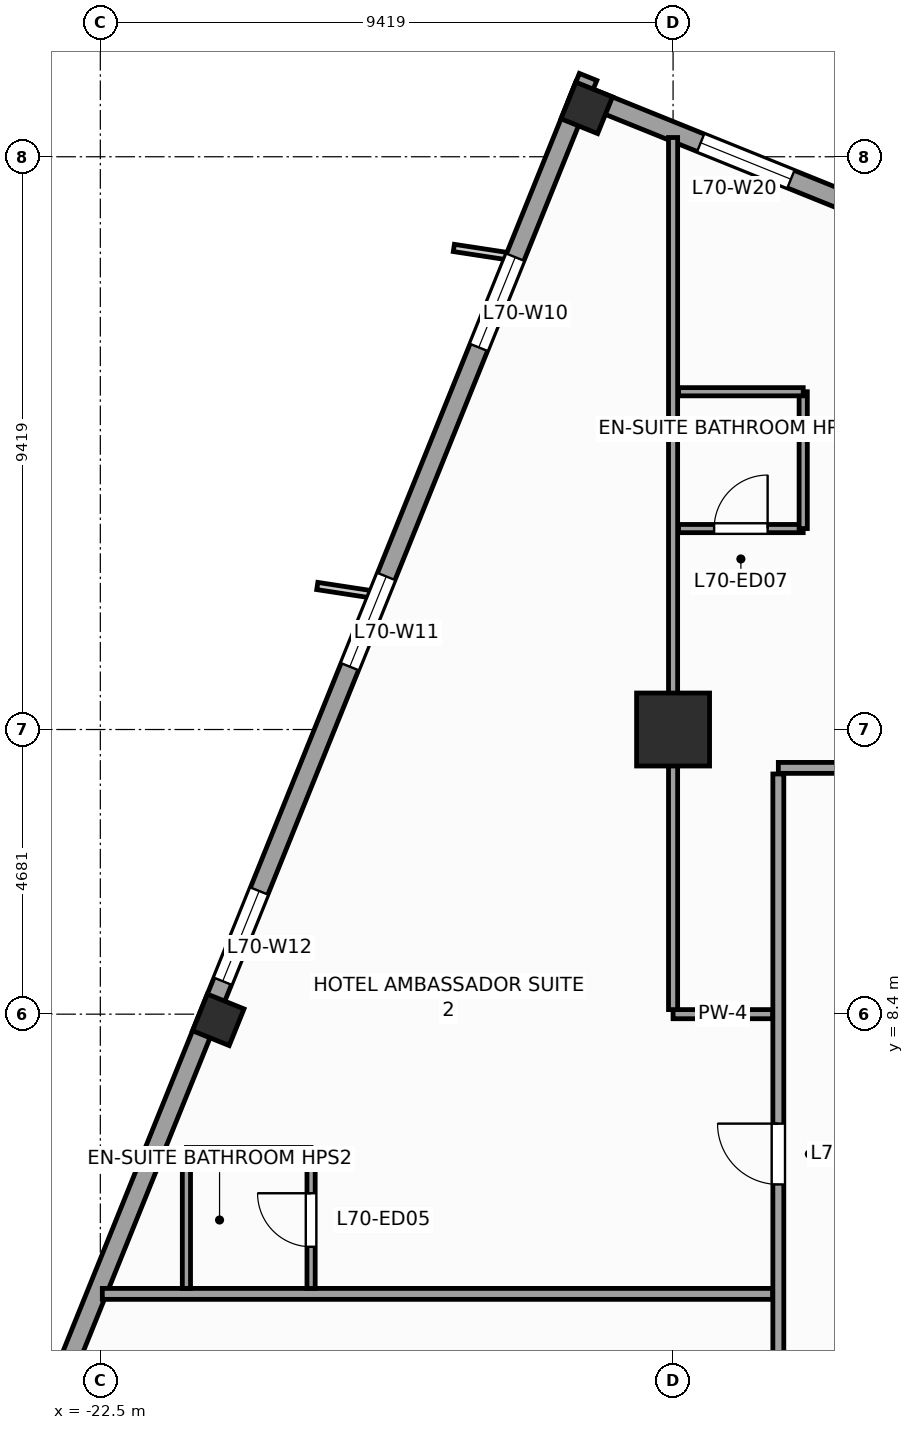
"""IFC4 building model, lengths in metres.
Left out: names, types, materials, properties, quantities, classifications, styles, units other than length and angle.
Written with IfcOpenShell. Run it as: python <this file> out.ifc"""

import sys

from ifc_helpers import new_model, si_unit, direction, frame, frame_2d, origin, origin_2d, place, context, subcontext, project, spatial, rectangle, extrude, source, transform, mapped, element, fill, save


model = new_model("IFC4")
c1 = context("Model", 3, precision=1e-05, world=origin(), true_north=direction((0.0, 1.0)))
c2 = subcontext(c1, "Body", "Model", "MODEL_VIEW")
j1 = project(units=[si_unit("LENGTHUNIT", "METRE"), si_unit("PLANEANGLEUNIT", "RADIAN")], contexts=[c1])
p1 = place(None, origin())
s1 = spatial("IfcSite", under=j1, at=p1, CompositionType="ELEMENT")
p2 = place(p1, origin())
s2 = spatial("IfcBuilding", under=s1, at=p2, CompositionType="ELEMENT")
p3 = place(p2, frame((0.0, 0.0, 286.8)))
s3 = spatial("IfcBuildingStorey", under=s2, at=p3, CompositionType="ELEMENT", Elevation=286.8)
m1 = source(origin(), c2, "Body", "SweptSolid", [
    extrude(rectangle(XDim=1.2, YDim=1.2, at=origin_2d()), origin(), (0.0, 0.0, 1.0), 3.6),
])
p4 = place(p3, frame((-13.081, 13.081, 0.0), z_axis=(0.0, 0.0, 1.0), x_axis=(1.0, 0.0, 0.0)))
e1 = element("IfcColumn", 1, at=p4, inside=s3, PredefinedType="COLUMN", context=c2, shape_type="MappedRepresentation", body=[
    mapped(m1, transform((0.0, 0.0, 0.0), scale=1.0)),
])
m2 = source(origin(), c2, "Body", "SweptSolid", [
    extrude(rectangle(XDim=0.65, YDim=0.65, at=origin_2d()), origin(), (0.0, 0.0, 1.0), 3.6),
])
for number, where, z_axis, x_axis in (
    (2, (-14.501, 23.304, 0.0), (0.0, 0.0, 1.0), (0.375, 0.927, 0.0)),
    (3, (-20.56, 8.307, 0.0), (0.0, 0.0, 1.0), (0.375, 0.927, 0.0)),
):
    element("IfcColumn", number, at=place(p3, frame(where, z_axis=z_axis, x_axis=x_axis)), inside=s3, PredefinedType="COLUMN", context=c2, shape_type="MappedRepresentation", body=[
        mapped(m2, transform((0.0, 0.0, 0.0), scale=1.0)),
    ])
p5 = place(p3, frame((-9.032, 21.278, 0.0), z_axis=(0.0, 0.0, 1.0), x_axis=(-0.927185411764, 0.374602739196, 0.0)))
e4 = element("IfcWall", 4, at=p5, inside=s3, PredefinedType="STANDARD", context=c2, shape_type="SweptSolid", body=[
    extrude(rectangle(XDim=6.155, YDim=0.31, at=frame_2d((3.078, 0.0))), origin(), (0.0, 0.0, 1.0), 3.35),
])
p6 = place(p5, frame((2.278, 0.0, 0.47)))
e5 = element("IfcOpeningElement", 5, at=p6, cuts=e4, PredefinedType="OPENING", context=c2, shape_type="SweptSolid", body=[
    extrude(rectangle(XDim=1.6, YDim=2.1, at=frame_2d((0.8, 1.05))), frame((0.0, 0.165, 0.0), z_axis=(0.0, -1.0, 0.0), x_axis=(1.0, 0.0, 0.0)), (0.0, 0.0, 1.0), 0.33),
])
p7 = place(p3, frame((-14.479, 23.813, 0.0), z_axis=(0.0, 0.0, 1.0), x_axis=(-0.374609557019, -0.927182657188, 0.0)))
e6 = element("IfcWall", 6, at=p7, inside=s3, PredefinedType="STANDARD", context=c2, shape_type="SweptSolid", body=[
    extrude(rectangle(XDim=33.31, YDim=0.31, at=frame_2d((16.655, 0.0))), origin(), (0.0, 0.0, 1.0), 2.75),
])
p8 = place(p7, frame((3.197, 0.0, 0.47)))
e7 = element("IfcOpeningElement", 7, at=p8, cuts=e6, PredefinedType="OPENING", context=c2, shape_type="SweptSolid", body=[
    extrude(rectangle(XDim=1.6, YDim=2.1, at=frame_2d((0.8, 1.05))), frame((0.0, 0.165, 0.0), z_axis=(0.0, -1.0, 0.0), x_axis=(1.0, 0.0, 0.0)), (0.0, 0.0, 1.0), 0.33),
])
p9 = place(p7, frame((8.86, 0.0, 0.47)))
e8 = element("IfcOpeningElement", 8, at=p9, cuts=e6, PredefinedType="OPENING", context=c2, shape_type="SweptSolid", body=[
    extrude(rectangle(XDim=1.6, YDim=2.1, at=frame_2d((0.8, 1.05))), frame((0.0, 0.165, 0.0), z_axis=(0.0, -1.0, 0.0), x_axis=(1.0, 0.0, 0.0)), (0.0, 0.0, 1.0), 0.33),
])
p10 = place(p7, frame((14.439, 0.0, 0.47)))
e9 = element("IfcOpeningElement", 9, at=p10, cuts=e6, PredefinedType="OPENING", context=c2, shape_type="SweptSolid", body=[
    extrude(rectangle(XDim=1.6, YDim=2.1, at=frame_2d((0.8, 1.05))), frame((0.0, 0.165, 0.0), z_axis=(0.0, -1.0, 0.0), x_axis=(1.0, 0.0, 0.0)), (0.0, 0.0, 1.0), 0.33),
])
p11 = place(p7, frame((23.351, 0.0, 0.47)))
e10 = element("IfcOpeningElement", 10, at=p11, cuts=e6, PredefinedType="OPENING", context=c2, shape_type="SweptSolid", body=[
    extrude(rectangle(XDim=1.6, YDim=2.1, at=frame_2d((0.8, 1.05))), frame((0.0, 0.165, 0.0), z_axis=(0.0, -1.0, 0.0), x_axis=(1.0, 0.0, 0.0)), (0.0, 0.0, 1.0), 0.33),
])
p12 = place(p7, frame((30.097, 0.0, 0.47)))
e11 = element("IfcOpeningElement", 11, at=p12, cuts=e6, PredefinedType="OPENING", context=c2, shape_type="SweptSolid", body=[
    extrude(rectangle(XDim=1.6, YDim=2.1, at=frame_2d((0.8, 1.05))), frame((0.0, 0.165, 0.0), z_axis=(0.0, -1.0, 0.0), x_axis=(1.0, 0.0, 0.0)), (0.0, 0.0, 1.0), 0.33),
])
p13 = place(p7, frame((27.59, 0.0, 0.47)))
e12 = element("IfcOpeningElement", 12, at=p13, cuts=e6, PredefinedType="OPENING", context=c2, shape_type="SweptSolid", body=[
    extrude(rectangle(XDim=1.6, YDim=2.1, at=frame_2d((0.8, 1.05))), frame((0.0, 0.165, 0.0), z_axis=(0.0, -1.0, 0.0), x_axis=(1.0, 0.0, 0.0)), (0.0, 0.0, 1.0), 0.33),
])
p14 = place(p3, frame((-11.35, 12.45, 0.0), z_axis=(0.0, 0.0, 1.0), x_axis=(1.0, 0.0, 0.0)))
e13 = element("IfcWall", 13, at=p14, inside=s3, PredefinedType="PARTITIONING", context=c2, shape_type="SweptSolid", body=[
    extrude(rectangle(XDim=22.8, YDim=0.18, at=frame_2d((11.4, 0.0))), origin(), (0.0, 0.0, 1.0), 3.35),
])
p15 = place(p14, frame((6.089, 0.0, 0.0)))
e14 = element("IfcOpeningElement", 14, at=p15, cuts=e13, PredefinedType="OPENING", context=c2, shape_type="SweptSolid", body=[
    extrude(rectangle(XDim=1.0, YDim=2.15, at=frame_2d((0.5, 1.075))), frame((0.0, 0.1, 0.0), z_axis=(0.0, -1.0, 0.0), x_axis=(1.0, 0.0, 0.0)), (0.0, 0.0, 1.0), 0.2),
])
p16 = place(p14, frame((17.161, 0.0, 0.0)))
e15 = element("IfcOpeningElement", 15, at=p16, cuts=e13, PredefinedType="OPENING", context=c2, shape_type="SweptSolid", body=[
    extrude(rectangle(XDim=1.0, YDim=2.15, at=frame_2d((0.5, 1.075))), frame((0.0, 0.1, 0.0), z_axis=(0.0, -1.0, 0.0), x_axis=(1.0, 0.0, 0.0)), (0.0, 0.0, 1.0), 0.2),
])
p17 = place(p3, frame((-11.35, -10.2, 0.0), z_axis=(0.0, 0.0, 1.0), x_axis=(0.0, 1.0, 0.0)))
e16 = element("IfcWall", 16, at=p17, inside=s3, PredefinedType="PARTITIONING", context=c2, shape_type="SweptSolid", body=[
    extrude(rectangle(XDim=22.55, YDim=0.18, at=frame_2d((11.275, 0.0))), origin(), (0.0, 0.0, 1.0), 3.35),
])
p18 = place(p17, frame((11.6, 0.0, 0.0)))
e17 = element("IfcOpeningElement", 17, at=p18, cuts=e16, PredefinedType="OPENING", context=c2, shape_type="SweptSolid", body=[
    extrude(rectangle(XDim=1.0, YDim=2.15, at=frame_2d((0.5, 1.075))), frame((0.0, 0.1, 0.0), z_axis=(0.0, -1.0, 0.0), x_axis=(1.0, 0.0, 0.0)), (0.0, 0.0, 1.0), 0.2),
])
p19 = place(p17, frame((15.8, 0.0, 0.0)))
e18 = element("IfcOpeningElement", 18, at=p19, cuts=e16, PredefinedType="OPENING", context=c2, shape_type="SweptSolid", body=[
    extrude(rectangle(XDim=1.0, YDim=2.15, at=frame_2d((0.5, 1.075))), frame((0.0, 0.1, 0.0), z_axis=(0.0, -1.0, 0.0), x_axis=(1.0, 0.0, 0.0)), (0.0, 0.0, 1.0), 0.2),
])
p20 = place(p17, frame((3.6, 0.0, 0.0)))
e19 = element("IfcOpeningElement", 19, at=p20, cuts=e16, PredefinedType="OPENING", context=c2, shape_type="SweptSolid", body=[
    extrude(rectangle(XDim=1.0, YDim=2.15, at=frame_2d((0.5, 1.075))), frame((0.0, 0.1, 0.0), z_axis=(0.0, -1.0, 0.0), x_axis=(1.0, 0.0, 0.0)), (0.0, 0.0, 1.0), 0.2),
])
p21 = place(p17, frame((7.8, 0.0, 0.0)))
e20 = element("IfcOpeningElement", 20, at=p21, cuts=e16, PredefinedType="OPENING", context=c2, shape_type="SweptSolid", body=[
    extrude(rectangle(XDim=1.0, YDim=2.15, at=frame_2d((0.5, 1.075))), frame((0.0, 0.1, 0.0), z_axis=(0.0, -1.0, 0.0), x_axis=(1.0, 0.0, 0.0)), (0.0, 0.0, 1.0), 0.2),
])
p22 = place(p3, frame((-11.445, 3.8, 0.0), z_axis=(0.0, 0.0, 1.0), x_axis=(-1.0, 0.0, 0.0)))
e21 = element("IfcWall", 21, at=p22, inside=s3, PredefinedType="PARTITIONING", context=c2, shape_type="SweptSolid", body=[
    extrude(rectangle(XDim=11.022, YDim=0.18, at=frame_2d((5.511, 0.0))), origin(), (0.0, 0.0, 1.0), 3.02),
])
p23 = place(p3, frame((-11.445, 8.4, 0.0), z_axis=(0.0, 0.0, 1.0), x_axis=(-1.0, 0.0, 0.0)))
e22 = element("IfcWall", 22, at=p23, inside=s3, PredefinedType="PARTITIONING", context=c2, shape_type="SweptSolid", body=[
    extrude(rectangle(XDim=1.636, YDim=0.15, at=frame_2d((0.818, 0.0))), origin(), (0.0, 0.0, 1.0), 3.35),
])
p24 = place(p3, frame((-13.081, 8.475, 0.0), z_axis=(0.0, 0.0, 1.0), x_axis=(0.0, 1.0, 0.0)))
e23 = element("IfcWall", 23, at=p24, inside=s3, PredefinedType="PARTITIONING", context=c2, shape_type="SweptSolid", body=[
    extrude(rectangle(XDim=14.342, YDim=0.15, at=frame_2d((7.171, 0.0))), origin(), (0.0, 0.0, 1.0), 2.45),
])
p25 = place(p3, frame((-19.034, 3.89, 0.0), z_axis=(0.0, 0.0, 1.0), x_axis=(0.0, 1.0, 0.0)))
e24 = element("IfcWall", 24, at=p25, inside=s3, PredefinedType="PARTITIONING", context=c2, shape_type="SweptSolid", body=[
    extrude(rectangle(XDim=2.25, YDim=0.135, at=frame_2d((1.125, 0.0))), origin(), (0.0, 0.0, 1.0), 3.35),
])
p26 = place(p25, frame((0.685, 0.0, 0.0)))
e25 = element("IfcOpeningElement", 25, at=p26, cuts=e24, PredefinedType="OPENING", context=c2, shape_type="SweptSolid", body=[
    extrude(rectangle(XDim=0.88, YDim=2.1, at=frame_2d((0.44, 1.05))), frame((0.0, 0.078, 0.0), z_axis=(0.0, -1.0, 0.0), x_axis=(1.0, 0.0, 0.0)), (0.0, 0.0, 1.0), 0.155),
])
p27 = place(p3, frame((-21.084, 6.14, 0.0), z_axis=(0.0, 0.0, 1.0), x_axis=(1.0, 0.0, 0.0)))
e26 = element("IfcWall", 26, at=p27, inside=s3, PredefinedType="PARTITIONING", context=c2, shape_type="SweptSolid", body=[
    extrude(rectangle(XDim=2.05, YDim=0.135, at=frame_2d((1.025, 0.0))), origin(), (0.0, 0.0, 1.0), 3.35),
])
p28 = place(p3, frame((-21.084, 3.89, 0.0), z_axis=(0.0, 0.0, 1.0), x_axis=(0.0, 1.0, 0.0)))
e27 = element("IfcWall", 27, at=p28, inside=s3, PredefinedType="PARTITIONING", context=c2, shape_type="SweptSolid", body=[
    extrude(rectangle(XDim=2.25, YDim=0.135, at=frame_2d((1.125, 0.0))), origin(), (0.0, 0.0, 1.0), 3.35),
])
p29 = place(p3, frame((-12.991, 16.386, 0.0), z_axis=(0.0, 0.0, 1.0), x_axis=(1.0, 0.0, 0.0)))
e28 = element("IfcWall", 28, at=p29, inside=s3, PredefinedType="PARTITIONING", context=c2, shape_type="SweptSolid", body=[
    extrude(rectangle(XDim=2.05, YDim=0.135, at=frame_2d((1.025, 0.0))), origin(), (0.0, 0.0, 1.0), 3.35),
])
p30 = place(p29, frame((0.585, 0.0, 0.0)))
e29 = element("IfcOpeningElement", 29, at=p30, cuts=e28, PredefinedType="OPENING", context=c2, shape_type="SweptSolid", body=[
    extrude(rectangle(XDim=0.88, YDim=2.1, at=frame_2d((0.44, 1.05))), frame((0.0, 0.078, 0.0), z_axis=(0.0, -1.0, 0.0), x_axis=(1.0, 0.0, 0.0)), (0.0, 0.0, 1.0), 0.155),
])
p31 = place(p3, frame((-10.941, 16.386, 0.0), z_axis=(0.0, 0.0, 1.0), x_axis=(0.0, 1.0, 0.0)))
e30 = element("IfcWall", 30, at=p31, inside=s3, PredefinedType="PARTITIONING", context=c2, shape_type="SweptSolid", body=[
    extrude(rectangle(XDim=2.25, YDim=0.135, at=frame_2d((1.125, 0.0))), origin(), (0.0, 0.0, 1.0), 3.35),
])
p32 = place(p3, frame((-12.991, 18.636, 0.0), z_axis=(0.0, 0.0, 1.0), x_axis=(1.0, 0.0, 0.0)))
e31 = element("IfcWall", 31, at=p32, inside=s3, PredefinedType="PARTITIONING", context=c2, shape_type="SweptSolid", body=[
    extrude(rectangle(XDim=2.05, YDim=0.135, at=frame_2d((1.025, 0.0))), origin(), (0.0, 0.0, 1.0), 3.35),
])
m3 = source(origin(), c2, "Body", "SweptSolid", [
    extrude(rectangle(XDim=1.6, YDim=2.1, at=frame_2d((0.8, 1.05))), frame((0.0, 0.03, 0.0), z_axis=(0.0, -1.0, 0.0), x_axis=(1.0, 0.0, 0.0)), (0.0, 0.0, 1.0), 0.06),
])
p33 = place(p8, origin())
e32 = element("IfcWindow", 32, at=p33, inside=s3, PartitioningType="SINGLE_PANEL", PredefinedType="WINDOW", context=c2, shape_type="MappedRepresentation", body=[
    mapped(m3, transform((0.0, 0.0, 0.0), scale=1.0)),
])
fill(e7, e32)
p34 = place(p9, origin())
e33 = element("IfcWindow", 33, at=p34, inside=s3, PartitioningType="SINGLE_PANEL", PredefinedType="WINDOW", context=c2, shape_type="MappedRepresentation", body=[
    mapped(m3, transform((0.0, 0.0, 0.0), scale=1.0)),
])
fill(e8, e33)
p35 = place(p10, origin())
e34 = element("IfcWindow", 34, at=p35, inside=s3, PartitioningType="SINGLE_PANEL", PredefinedType="WINDOW", context=c2, shape_type="MappedRepresentation", body=[
    mapped(m3, transform((0.0, 0.0, 0.0), scale=1.0)),
])
fill(e9, e34)
p36 = place(p6, origin())
e35 = element("IfcWindow", 35, at=p36, inside=s3, PartitioningType="SINGLE_PANEL", PredefinedType="WINDOW", context=c2, shape_type="MappedRepresentation", body=[
    mapped(m3, transform((0.0, 0.0, 0.0), scale=1.0)),
])
fill(e5, e35)
m4 = source(origin(), c2, "Body", "SweptSolid", [
    extrude(rectangle(XDim=1.0, YDim=2.15, at=frame_2d((0.5, 1.075))), frame((0.0, 0.025, 0.0), z_axis=(0.0, -1.0, 0.0), x_axis=(1.0, 0.0, 0.0)), (0.0, 0.0, 1.0), 0.05),
])
p37 = place(p19, origin())
e36 = element("IfcDoor", 36, at=p37, inside=s3, OperationType="SINGLE_SWING_RIGHT", PredefinedType="DOOR", context=c2, shape_type="MappedRepresentation", body=[
    mapped(m4, transform((0.0, 0.0, 0.0), scale=1.0)),
])
fill(e18, e36)
m5 = source(origin(), c2, "Body", "SweptSolid", [
    extrude(rectangle(XDim=0.88, YDim=2.1, at=frame_2d((0.44, 1.05))), frame((0.0, 0.025, 0.0), z_axis=(0.0, -1.0, 0.0), x_axis=(1.0, 0.0, 0.0)), (0.0, 0.0, 1.0), 0.05),
])
p38 = place(p26, origin())
e37 = element("IfcDoor", 37, at=p38, inside=s3, OperationType="SINGLE_SWING_RIGHT", PredefinedType="DOOR", context=c2, shape_type="MappedRepresentation", body=[
    mapped(m5, transform((0.0, 0.0, 0.0), scale=1.0)),
])
fill(e25, e37)
p39 = place(p30, origin())
e38 = element("IfcDoor", 38, at=p39, inside=s3, OperationType="SINGLE_SWING_RIGHT", PredefinedType="DOOR", context=c2, shape_type="MappedRepresentation", body=[
    mapped(m5, transform((0.0, 0.0, 0.0), scale=1.0)),
])
fill(e29, e38)
save(model, sys.argv[1])
